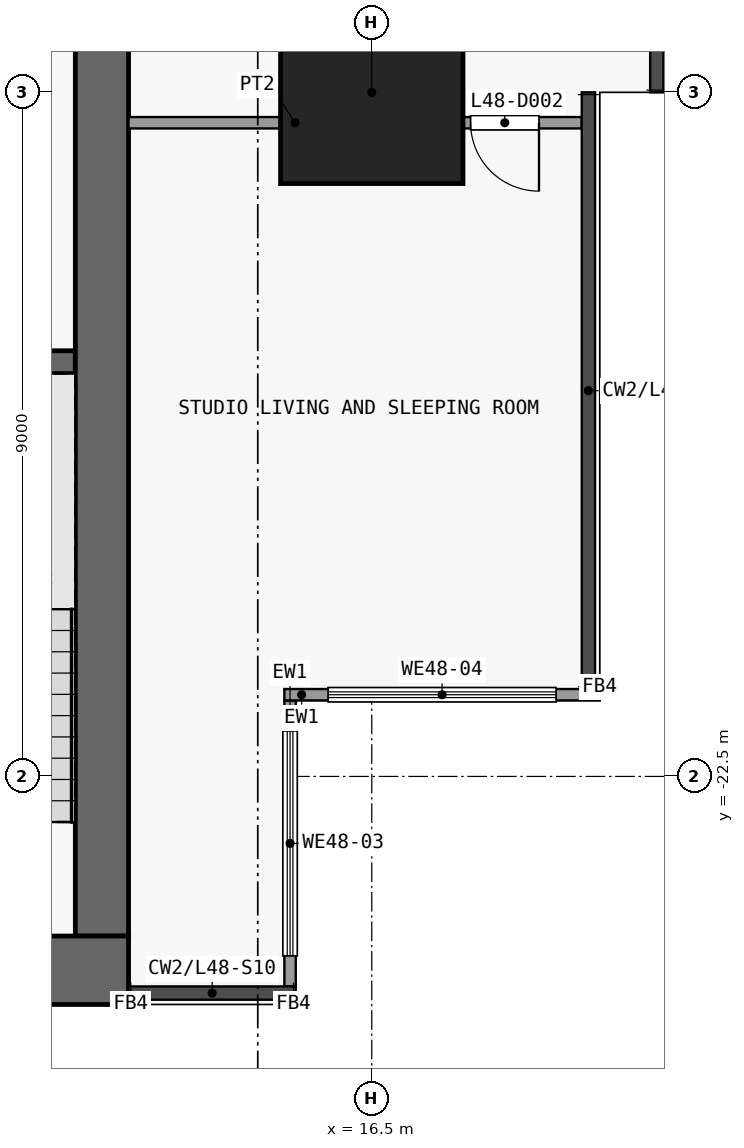
"""IFC4 building model, lengths in metres.
Left out: names, types, materials, properties, quantities, classifications, styles, units other than length and angle.
Written with IfcOpenShell. Run it as: python <this file> out.ifc"""

import sys

from ifc_helpers import new_model, si_unit, direction, frame, frame_2d, origin, origin_2d, place, context, subcontext, project, spatial, rectangle, extrude, element, fill, save


model = new_model("IFC4")
c1 = context("Model", 3, precision=1e-05, world=origin(), true_north=direction((0.0, 1.0)))
c2 = subcontext(c1, "Body", "Model", "MODEL_VIEW")
j1 = project(units=[si_unit("LENGTHUNIT", "METRE"), si_unit("PLANEANGLEUNIT", "RADIAN")], contexts=[c1])
p1 = place(None, origin())
s1 = spatial("IfcSite", under=j1, at=p1, CompositionType="ELEMENT")
p2 = place(p1, origin())
s2 = spatial("IfcBuilding", under=s1, at=p2, CompositionType="ELEMENT")
p3 = place(p2, frame((0.0, 0.0, 192.5)))
s3 = spatial("IfcBuildingStorey", under=s2, at=p3, CompositionType="ELEMENT", Elevation=192.5)
p4 = place(p3, frame((16.5, -13.5, 0.0), z_axis=(0.0, 0.0, 1.0), x_axis=(1.0, 0.0, 0.0)))
e1 = element("IfcColumn", 1, at=p4, inside=s3, PredefinedType="COLUMN", context=c2, shape_type="SweptSolid", body=[
    extrude(rectangle(XDim=2.4, YDim=2.4, at=origin_2d()), origin(), (0.0, 0.0, 1.0), 3.6),
])
p5 = place(p3, frame((-13.3, -25.05, 0.0), z_axis=(0.0, 0.0, 1.0), x_axis=(1.0, 0.0, 0.0)))
e2 = element("IfcWall", 2, at=p5, inside=s3, PredefinedType="SHEAR", context=c2, shape_type="SweptSolid", body=[
    extrude(rectangle(XDim=26.6, YDim=0.9, at=frame_2d((13.3, 0.0))), origin(), (0.0, 0.0, 1.0), 3.3),
])
p6 = place(p3, frame((12.95, -24.6, 0.0), z_axis=(0.0, 0.0, 1.0), x_axis=(0.0, 1.0, 0.0)))
e3 = element("IfcWall", 3, at=p6, inside=s3, PredefinedType="SHEAR", context=c2, shape_type="SweptSolid", body=[
    extrude(rectangle(XDim=16.1, YDim=0.7, at=frame_2d((8.05, 0.0))), origin(), (0.0, 0.0, 1.0), 3.3),
])
p7 = place(p3, frame((9.5, -17.05, 0.0), z_axis=(0.0, 0.0, 1.0), x_axis=(1.0, 0.0, 0.0)))
e4 = element("IfcWall", 4, at=p7, inside=s3, PredefinedType="SHEAR", context=c2, shape_type="SweptSolid", body=[
    extrude(rectangle(XDim=3.1, YDim=0.3, at=frame_2d((1.55, 0.0))), origin(), (0.0, 0.0, 1.0), 3.3),
])
p8 = place(p3, frame((15.425, -21.5, 0.0), z_axis=(0.0, 0.0, 1.0), x_axis=(0.0, -1.0, 0.0)))
e5 = element("IfcWall", 5, at=p8, inside=s3, PredefinedType="SOLIDWALL", context=c2, shape_type="SweptSolid", body=[
    extrude(rectangle(XDim=3.762, YDim=0.15, at=frame_2d((1.881, 0.0))), origin(), (0.0, 0.0, 1.0), 3.3),
])
p9 = place(p8, frame((0.401, 0.0, 0.9)))
e6 = element("IfcOpeningElement", 6, at=p9, cuts=e5, PredefinedType="OPENING", context=c2, shape_type="SweptSolid", body=[
    extrude(rectangle(XDim=2.96, YDim=2.4, at=frame_2d((1.48, 1.2))), frame((0.0, 0.085, 0.0), z_axis=(0.0, -1.0, 0.0), x_axis=(1.0, 0.0, 0.0)), (0.0, 0.0, 1.0), 0.17),
])
p10 = place(p3, frame((19.5, -21.425, 0.0), z_axis=(0.0, 0.0, 1.0), x_axis=(-1.0, 0.0, 0.0)))
e7 = element("IfcWall", 7, at=p10, inside=s3, PredefinedType="SOLIDWALL", context=c2, shape_type="SweptSolid", body=[
    extrude(rectangle(XDim=4.15, YDim=0.15, at=frame_2d((2.075, 0.0))), origin(), (0.0, 0.0, 1.0), 3.3),
])
p11 = place(p10, frame((0.575, 0.0, 0.9)))
e8 = element("IfcOpeningElement", 8, at=p11, cuts=e7, PredefinedType="OPENING", context=c2, shape_type="SweptSolid", body=[
    extrude(rectangle(XDim=3.0, YDim=2.4, at=frame_2d((1.5, 1.2))), frame((0.0, 0.085, 0.0), z_axis=(0.0, -1.0, 0.0), x_axis=(1.0, 0.0, 0.0)), (0.0, 0.0, 1.0), 0.17),
])
p12 = place(p3, frame((13.3, -13.9, 0.0), z_axis=(0.0, 0.0, 1.0), x_axis=(1.0, 0.0, 0.0)))
e9 = element("IfcWall", 9, at=p12, inside=s3, PredefinedType="PARTITIONING", context=c2, shape_type="SweptSolid", body=[
    extrude(rectangle(XDim=5.962, YDim=0.15, at=frame_2d((2.981, 0.0))), origin(), (0.0, 0.0, 1.0), 3.3),
])
p13 = place(p12, frame((4.5, 0.0, 0.0)))
e10 = element("IfcOpeningElement", 10, at=p13, cuts=e9, PredefinedType="OPENING", context=c2, shape_type="SweptSolid", body=[
    extrude(rectangle(XDim=0.9, YDim=2.1, at=frame_2d((0.45, 1.05))), frame((0.0, 0.085, 0.0), z_axis=(0.0, -1.0, 0.0), x_axis=(1.0, 0.0, 0.0)), (0.0, 0.0, 1.0), 0.17),
])
p14 = place(p3, frame((16.3, -13.825, 0.0), z_axis=(0.0, 0.0, 1.0), x_axis=(0.0, 1.0, 0.0)))
e11 = element("IfcWall", 11, at=p14, inside=s3, PredefinedType="PARTITIONING", context=c2, shape_type="SweptSolid", body=[
    extrude(rectangle(XDim=2.85, YDim=0.15, at=frame_2d((1.425, 0.0))), origin(), (0.0, 0.0, 1.0), 3.3),
])
p15 = place(p9, origin())
e12 = element("IfcWindow", 12, at=p15, inside=s3, PartitioningType="SINGLE_PANEL", PredefinedType="WINDOW", context=c2, shape_type="SweptSolid", body=[
    extrude(rectangle(XDim=2.96, YDim=2.4, at=frame_2d((1.48, 1.2))), frame((0.0, 0.03, 0.0), z_axis=(0.0, -1.0, 0.0), x_axis=(1.0, 0.0, 0.0)), (0.0, 0.0, 1.0), 0.06),
])
fill(e6, e12)
p16 = place(p11, origin())
e13 = element("IfcWindow", 13, at=p16, inside=s3, PartitioningType="SINGLE_PANEL", PredefinedType="WINDOW", context=c2, shape_type="SweptSolid", body=[
    extrude(rectangle(XDim=3.0, YDim=2.4, at=frame_2d((1.5, 1.2))), frame((0.0, 0.03, 0.0), z_axis=(0.0, -1.0, 0.0), x_axis=(1.0, 0.0, 0.0)), (0.0, 0.0, 1.0), 0.06),
])
fill(e8, e13)
p17 = place(p13, origin())
e14 = element("IfcDoor", 14, at=p17, inside=s3, OperationType="SINGLE_SWING_RIGHT", PredefinedType="DOOR", context=c2, shape_type="SweptSolid", body=[
    extrude(rectangle(XDim=0.9, YDim=2.1, at=frame_2d((0.45, 1.05))), frame((0.0, 0.025, 0.0), z_axis=(0.0, -1.0, 0.0), x_axis=(1.0, 0.0, 0.0)), (0.0, 0.0, 1.0), 0.05),
])
fill(e10, e14)
save(model, sys.argv[1])
